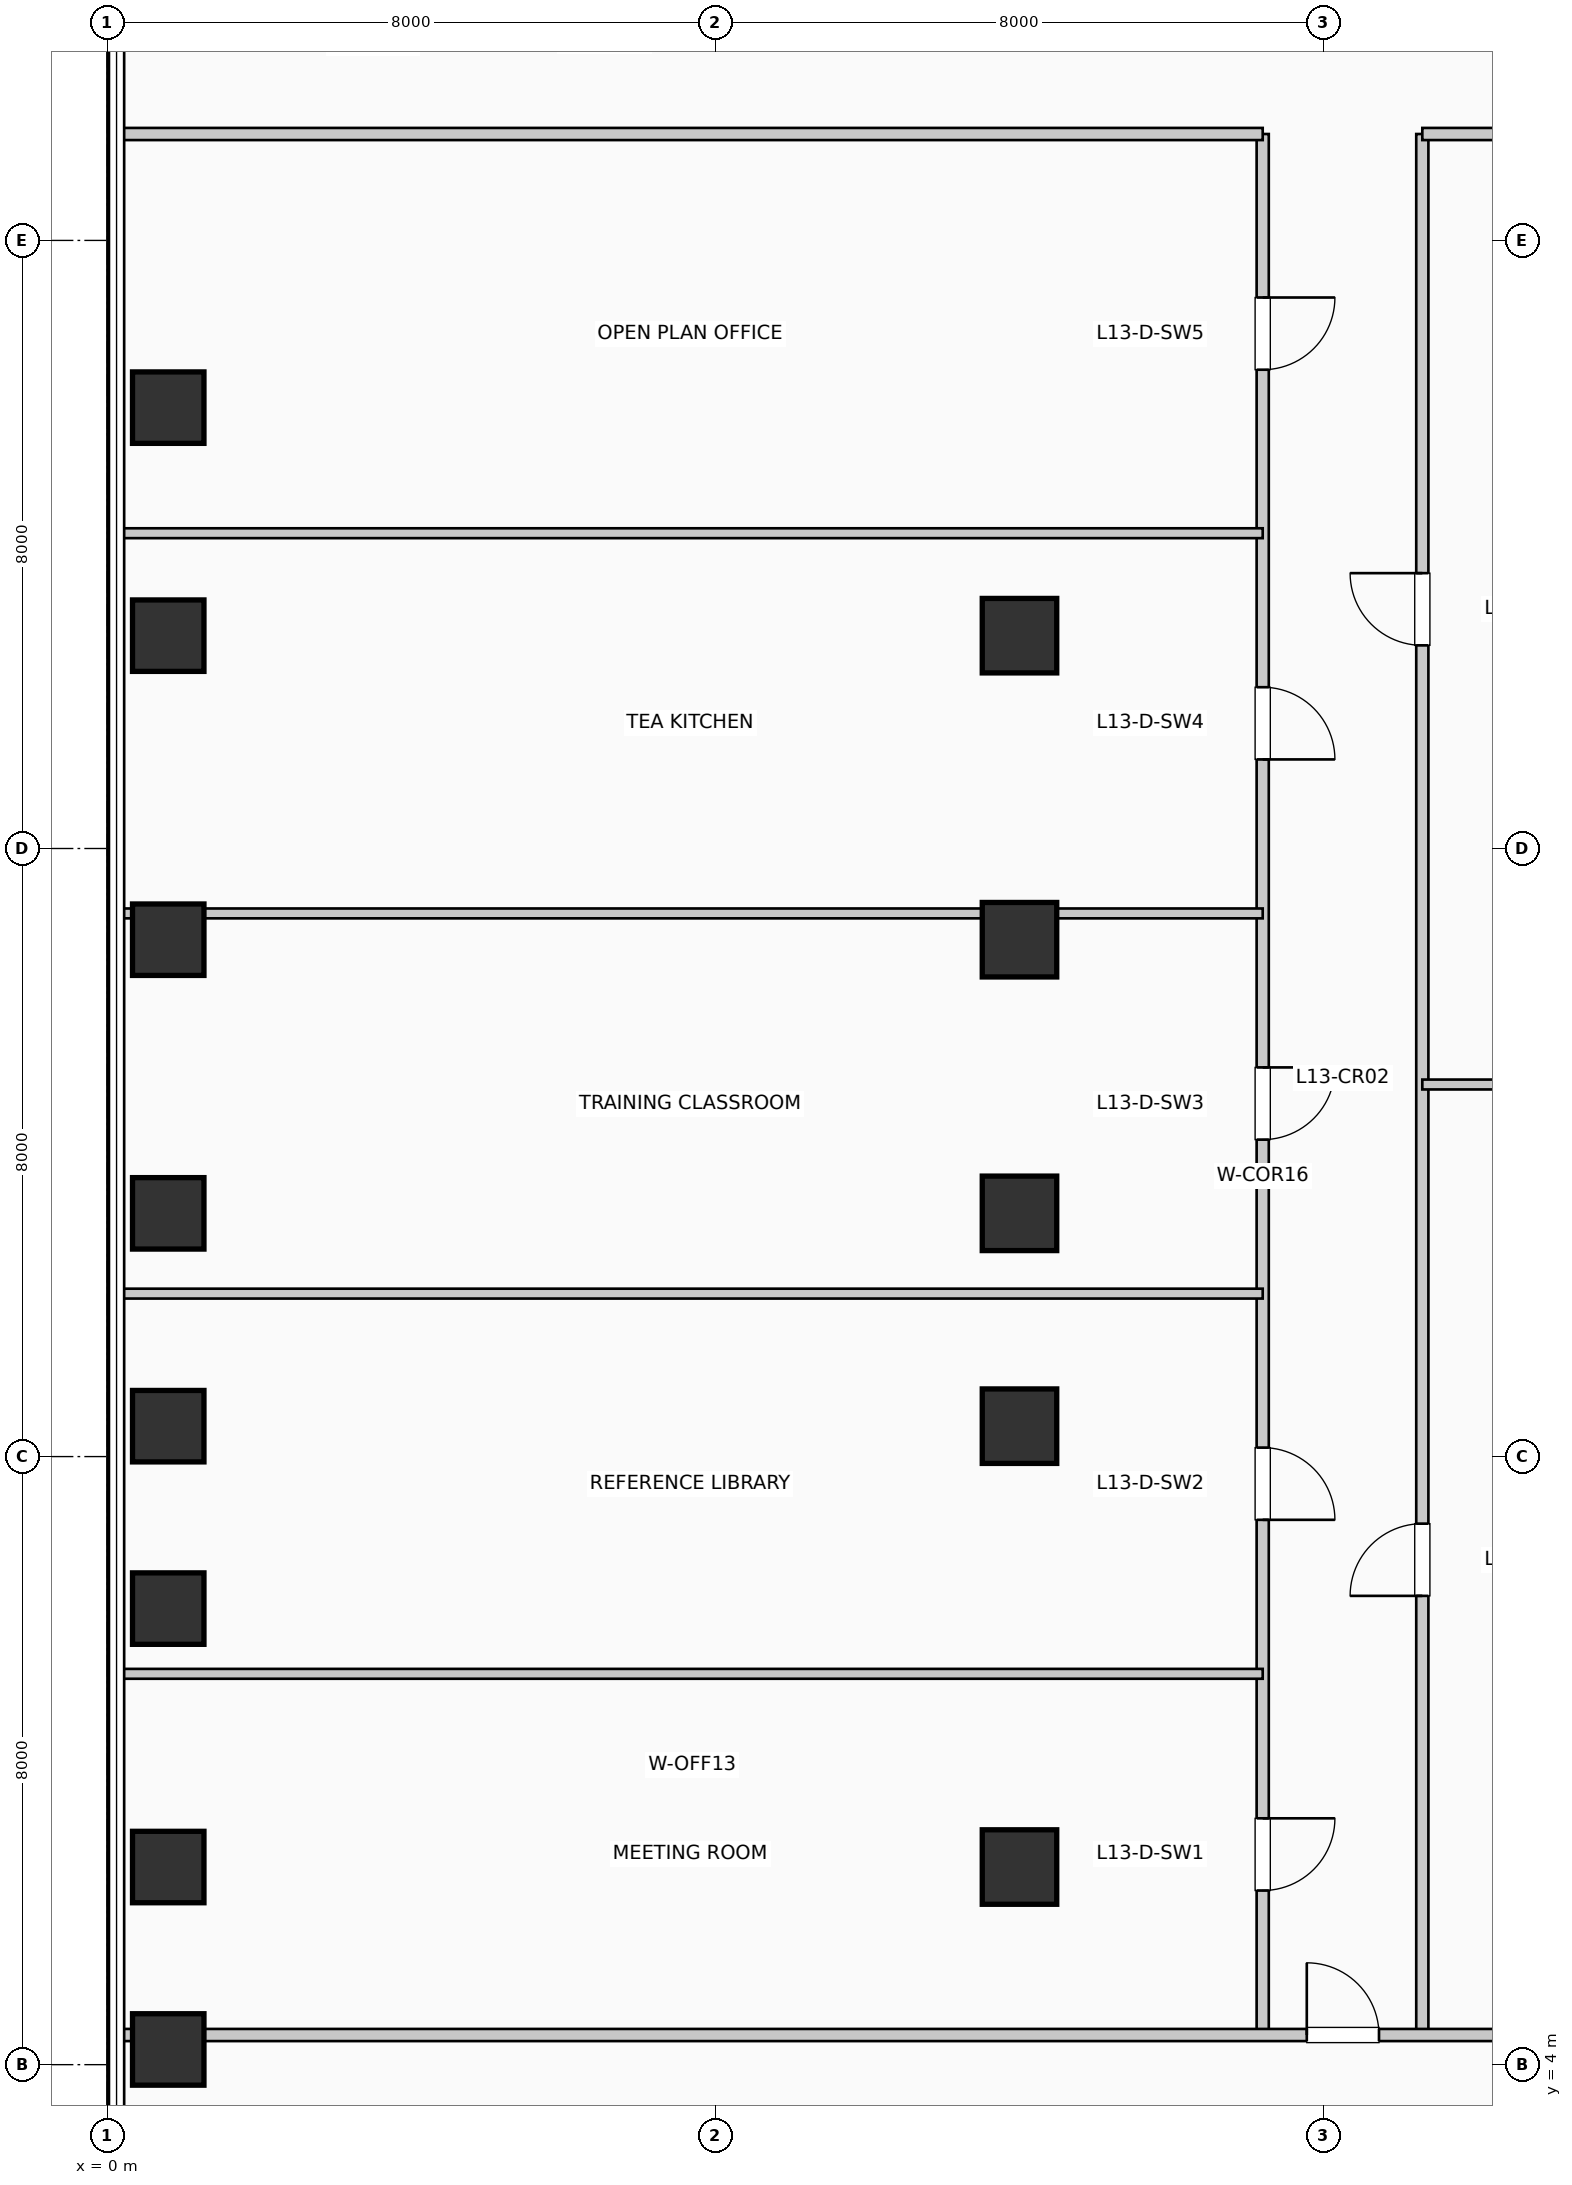
"""IFC4 building model, lengths in metres.
Left out: names, types, materials, properties, quantities, classifications, styles, units other than length and angle.
Written with IfcOpenShell. Run it as: python <this file> out.ifc"""

import sys

from ifc_helpers import new_model, si_unit, direction, frame, frame_2d, origin, origin_2d, place, context, subcontext, project, spatial, rectangle, extrude, element, fill, save


model = new_model("IFC4")
c1 = context("Model", 3, precision=1e-05, world=origin(), true_north=direction((0.0, 1.0)))
c2 = subcontext(c1, "Body", "Model", "MODEL_VIEW")
j1 = project(units=[si_unit("LENGTHUNIT", "METRE"), si_unit("PLANEANGLEUNIT", "RADIAN")], contexts=[c1])
p1 = place(None, origin())
s1 = spatial("IfcSite", under=j1, at=p1, CompositionType="ELEMENT")
p2 = place(p1, origin())
s2 = spatial("IfcBuilding", under=s1, at=p2, CompositionType="ELEMENT")
p3 = place(p2, frame((0.0, 0.0, 58.08)))
s3 = spatial("IfcBuildingStorey", under=s2, at=p3, CompositionType="ELEMENT", Elevation=58.08)
for number, where, z_axis, x_axis in (
    (1, (0.8, 4.2, 0.0), (0.0, 0.0, 1.0), (1.0, 0.0, 0.0)),
    (2, (0.8, 6.6, 0.0), (0.0, 0.0, 1.0), (1.0, 0.0, 0.0)),
    (3, (0.8, 10.0, 0.0), (0.0, 0.0, 1.0), (1.0, 0.0, 0.0)),
    (4, (0.8, 12.4, 0.0), (0.0, 0.0, 1.0), (1.0, 0.0, 0.0)),
    (5, (0.8, 15.2, 0.0), (0.0, 0.0, 1.0), (1.0, 0.0, 0.0)),
    (6, (0.8, 18.8, 0.0), (0.0, 0.0, 1.0), (1.0, 0.0, 0.0)),
    (7, (0.8, 22.8, 0.0), (0.0, 0.0, 1.0), (1.0, 0.0, 0.0)),
    (8, (0.8, 25.8, 0.0), (0.0, 0.0, 1.0), (1.0, 0.0, 0.0)),
):
    element("IfcColumn", number, at=place(p3, frame(where, z_axis=z_axis, x_axis=x_axis)), inside=s3, PredefinedType="COLUMN", context=c2, shape_type="SweptSolid", body=[
        extrude(rectangle(XDim=0.94, YDim=0.94, at=origin_2d()), origin(), (0.0, 0.0, 1.0), 3.96),
    ])
for number, where, z_axis, x_axis in (
    (9, (12.0, 6.6, 0.0), (0.0, 0.0, 1.0), (1.0, 0.0, 0.0)),
    (10, (12.0, 12.4, 0.0), (0.0, 0.0, 1.0), (1.0, 0.0, 0.0)),
    (11, (12.0, 15.2, 0.0), (0.0, 0.0, 1.0), (1.0, 0.0, 0.0)),
    (12, (12.0, 18.8, 0.0), (0.0, 0.0, 1.0), (1.0, 0.0, 0.0)),
    (13, (12.0, 22.8, 0.0), (0.0, 0.0, 1.0), (1.0, 0.0, 0.0)),
):
    element("IfcColumn", number, at=place(p3, frame(where, z_axis=z_axis, x_axis=x_axis)), inside=s3, PredefinedType="COLUMN", context=c2, shape_type="SweptSolid", body=[
        extrude(rectangle(XDim=0.98, YDim=0.98, at=origin_2d()), origin(), (0.0, 0.0, 1.0), 3.96),
    ])
p4 = place(p3, frame((15.2, 4.39, 0.0), z_axis=(0.0, 0.0, 1.0), x_axis=(0.0, 1.0, 0.0)))
e14 = element("IfcWall", 14, at=p4, inside=s3, PredefinedType="PARTITIONING", context=c2, shape_type="SweptSolid", body=[
    extrude(rectangle(XDim=25.01, YDim=0.16, at=frame_2d((12.505, 0.0))), origin(), (0.0, 0.0, 1.0), 3.71),
])
p5 = place(p4, frame((2.851, 0.0, 0.0), z_axis=(0.0, 0.0, 1.0), x_axis=(-1.0, 0.0, 0.0)))
e15 = element("IfcOpeningElement", 15, at=p5, cuts=e14, PredefinedType="OPENING", context=c2, shape_type="SweptSolid", body=[
    extrude(rectangle(XDim=0.95, YDim=2.15, at=frame_2d((0.475, 1.075))), frame((0.0, 0.09, 0.0), z_axis=(0.0, -1.0, 0.0), x_axis=(1.0, 0.0, 0.0)), (0.0, 0.0, 1.0), 0.18),
])
p6 = place(p4, frame((7.728, 0.0, 0.0), z_axis=(0.0, 0.0, 1.0), x_axis=(-1.0, 0.0, 0.0)))
e16 = element("IfcOpeningElement", 16, at=p6, cuts=e14, PredefinedType="OPENING", context=c2, shape_type="SweptSolid", body=[
    extrude(rectangle(XDim=0.95, YDim=2.15, at=frame_2d((0.475, 1.075))), frame((0.0, 0.09, 0.0), z_axis=(0.0, -1.0, 0.0), x_axis=(1.0, 0.0, 0.0)), (0.0, 0.0, 1.0), 0.18),
])
p7 = place(p4, frame((12.73, 0.0, 0.0), z_axis=(0.0, 0.0, 1.0), x_axis=(-1.0, 0.0, 0.0)))
e17 = element("IfcOpeningElement", 17, at=p7, cuts=e14, PredefinedType="OPENING", context=c2, shape_type="SweptSolid", body=[
    extrude(rectangle(XDim=0.95, YDim=2.15, at=frame_2d((0.475, 1.075))), frame((0.0, 0.09, 0.0), z_axis=(0.0, -1.0, 0.0), x_axis=(1.0, 0.0, 0.0)), (0.0, 0.0, 1.0), 0.18),
])
p8 = place(p4, frame((17.732, 0.0, 0.0), z_axis=(0.0, 0.0, 1.0), x_axis=(-1.0, 0.0, 0.0)))
e18 = element("IfcOpeningElement", 18, at=p8, cuts=e14, PredefinedType="OPENING", context=c2, shape_type="SweptSolid", body=[
    extrude(rectangle(XDim=0.95, YDim=2.15, at=frame_2d((0.475, 1.075))), frame((0.0, 0.09, 0.0), z_axis=(0.0, -1.0, 0.0), x_axis=(1.0, 0.0, 0.0)), (0.0, 0.0, 1.0), 0.18),
])
p9 = place(p4, frame((22.859, 0.0, 0.0), z_axis=(0.0, 0.0, 1.0), x_axis=(-1.0, 0.0, 0.0)))
e19 = element("IfcOpeningElement", 19, at=p9, cuts=e14, PredefinedType="OPENING", context=c2, shape_type="SweptSolid", body=[
    extrude(rectangle(XDim=0.95, YDim=2.15, at=frame_2d((0.475, 1.075))), frame((0.0, 0.09, 0.0), z_axis=(0.0, -1.0, 0.0), x_axis=(1.0, 0.0, 0.0)), (0.0, 0.0, 1.0), 0.18),
])
p10 = place(p3, frame((17.3, 4.39, 0.0), z_axis=(0.0, 0.0, 1.0), x_axis=(0.0, 1.0, 0.0)))
e20 = element("IfcWall", 20, at=p10, inside=s3, PredefinedType="PARTITIONING", context=c2, shape_type="SweptSolid", body=[
    extrude(rectangle(XDim=25.01, YDim=0.16, at=frame_2d((12.505, 0.0))), origin(), (0.0, 0.0, 1.0), 3.71),
])
p11 = place(p10, frame((5.778, 0.0, 0.0)))
e21 = element("IfcOpeningElement", 21, at=p11, cuts=e20, PredefinedType="OPENING", context=c2, shape_type="SweptSolid", body=[
    extrude(rectangle(XDim=0.95, YDim=2.15, at=frame_2d((0.475, 1.075))), frame((0.0, 0.09, 0.0), z_axis=(0.0, -1.0, 0.0), x_axis=(1.0, 0.0, 0.0)), (0.0, 0.0, 1.0), 0.18),
])
p12 = place(p10, frame((18.282, 0.0, 0.0)))
e22 = element("IfcOpeningElement", 22, at=p12, cuts=e20, PredefinedType="OPENING", context=c2, shape_type="SweptSolid", body=[
    extrude(rectangle(XDim=0.95, YDim=2.15, at=frame_2d((0.475, 1.075))), frame((0.0, 0.09, 0.0), z_axis=(0.0, -1.0, 0.0), x_axis=(1.0, 0.0, 0.0)), (0.0, 0.0, 1.0), 0.18),
])
p13 = place(p3, frame((0.19, 4.39, 0.0), z_axis=(0.0, 0.0, 1.0), x_axis=(1.0, 0.0, 0.0)))
e23 = element("IfcWall", 23, at=p13, inside=s3, PredefinedType="PARTITIONING", context=c2, shape_type="SweptSolid", body=[
    extrude(rectangle(XDim=23.26, YDim=0.16, at=frame_2d((11.63, 0.0))), origin(), (0.0, 0.0, 1.0), 2.995),
])
p14 = place(p13, frame((15.59, 0.0, 0.0)))
e24 = element("IfcOpeningElement", 24, at=p14, cuts=e23, PredefinedType="OPENING", context=c2, shape_type="SweptSolid", body=[
    extrude(rectangle(XDim=0.95, YDim=2.15, at=frame_2d((0.475, 1.075))), frame((0.0, 0.09, 0.0), z_axis=(0.0, -1.0, 0.0), x_axis=(1.0, 0.0, 0.0)), (0.0, 0.0, 1.0), 0.18),
])
p15 = place(p3, frame((0.19, 29.4, 0.0), z_axis=(0.0, 0.0, 1.0), x_axis=(1.0, 0.0, 0.0)))
e25 = element("IfcWall", 25, at=p15, inside=s3, PredefinedType="PARTITIONING", context=c2, shape_type="SweptSolid", body=[
    extrude(rectangle(XDim=15.01, YDim=0.16, at=frame_2d((7.505, 0.0))), origin(), (0.0, 0.0, 1.0), 3.365),
])
p16 = place(p3, frame((17.3, 29.4, 0.0), z_axis=(0.0, 0.0, 1.0), x_axis=(1.0, 0.0, 0.0)))
e26 = element("IfcWall", 26, at=p16, inside=s3, PredefinedType="PARTITIONING", context=c2, shape_type="SweptSolid", body=[
    extrude(rectangle(XDim=6.15, YDim=0.16, at=frame_2d((3.075, 0.0))), origin(), (0.0, 0.0, 1.0), 3.71),
])
for number, where, z_axis, x_axis in (
    (27, (0.19, 9.142, 0.0), (0.0, 0.0, 1.0), (1.0, 0.0, 0.0)),
    (28, (0.19, 14.144, 0.0), (0.0, 0.0, 1.0), (1.0, 0.0, 0.0)),
):
    element("IfcWall", number, at=place(p3, frame(where, z_axis=z_axis, x_axis=x_axis)), inside=s3, PredefinedType="PARTITIONING", context=c2, shape_type="SweptSolid", body=[
        extrude(rectangle(XDim=15.01, YDim=0.13, at=frame_2d((7.505, 0.0))), origin(), (0.0, 0.0, 1.0), 3.71),
    ])
p17 = place(p3, frame((0.19, 19.146, 0.0), z_axis=(0.0, 0.0, 1.0), x_axis=(1.0, 0.0, 0.0)))
e29 = element("IfcWall", 29, at=p17, inside=s3, PredefinedType="PARTITIONING", context=c2, shape_type="SweptSolid", body=[
    extrude(rectangle(XDim=15.01, YDim=0.13, at=frame_2d((7.505, 0.0))), origin(), (0.0, 0.0, 1.0), 2.995),
])
p18 = place(p3, frame((0.19, 24.148, 0.0), z_axis=(0.0, 0.0, 1.0), x_axis=(1.0, 0.0, 0.0)))
e30 = element("IfcWall", 30, at=p18, inside=s3, PredefinedType="PARTITIONING", context=c2, shape_type="SweptSolid", body=[
    extrude(rectangle(XDim=15.01, YDim=0.13, at=frame_2d((7.505, 0.0))), origin(), (0.0, 0.0, 1.0), 3.71),
])
p19 = place(p3, frame((17.3, 16.895, 0.0), z_axis=(0.0, 0.0, 1.0), x_axis=(1.0, 0.0, 0.0)))
e31 = element("IfcWall", 31, at=p19, inside=s3, PredefinedType="PARTITIONING", context=c2, shape_type="SweptSolid", body=[
    extrude(rectangle(XDim=6.15, YDim=0.13, at=frame_2d((3.075, 0.0))), origin(), (0.0, 0.0, 1.0), 3.71),
])
p20 = place(p14, origin())
e32 = element("IfcDoor", 32, at=p20, inside=s3, OperationType="SINGLE_SWING_LEFT", PredefinedType="DOOR", context=c2, shape_type="SweptSolid", body=[
    extrude(rectangle(XDim=0.95, YDim=2.15, at=frame_2d((0.475, 1.075))), frame((0.0, 0.025, 0.0), z_axis=(0.0, -1.0, 0.0), x_axis=(1.0, 0.0, 0.0)), (0.0, 0.0, 1.0), 0.05),
])
fill(e24, e32)
p21 = place(p5, origin())
e33 = element("IfcDoor", 33, at=p21, inside=s3, OperationType="SINGLE_SWING_RIGHT", PredefinedType="DOOR", context=c2, shape_type="SweptSolid", body=[
    extrude(rectangle(XDim=0.95, YDim=2.15, at=frame_2d((0.475, 1.075))), frame((0.0, 0.025, 0.0), z_axis=(0.0, -1.0, 0.0), x_axis=(1.0, 0.0, 0.0)), (0.0, 0.0, 1.0), 0.05),
])
fill(e15, e33)
p22 = place(p6, origin())
e34 = element("IfcDoor", 34, at=p22, inside=s3, OperationType="SINGLE_SWING_LEFT", PredefinedType="DOOR", context=c2, shape_type="SweptSolid", body=[
    extrude(rectangle(XDim=0.95, YDim=2.15, at=frame_2d((0.475, 1.075))), frame((0.0, 0.025, 0.0), z_axis=(0.0, -1.0, 0.0), x_axis=(1.0, 0.0, 0.0)), (0.0, 0.0, 1.0), 0.05),
])
fill(e16, e34)
p23 = place(p7, origin())
e35 = element("IfcDoor", 35, at=p23, inside=s3, OperationType="SINGLE_SWING_RIGHT", PredefinedType="DOOR", context=c2, shape_type="SweptSolid", body=[
    extrude(rectangle(XDim=0.95, YDim=2.15, at=frame_2d((0.475, 1.075))), frame((0.0, 0.025, 0.0), z_axis=(0.0, -1.0, 0.0), x_axis=(1.0, 0.0, 0.0)), (0.0, 0.0, 1.0), 0.05),
])
fill(e17, e35)
p24 = place(p8, origin())
e36 = element("IfcDoor", 36, at=p24, inside=s3, OperationType="SINGLE_SWING_LEFT", PredefinedType="DOOR", context=c2, shape_type="SweptSolid", body=[
    extrude(rectangle(XDim=0.95, YDim=2.15, at=frame_2d((0.475, 1.075))), frame((0.0, 0.025, 0.0), z_axis=(0.0, -1.0, 0.0), x_axis=(1.0, 0.0, 0.0)), (0.0, 0.0, 1.0), 0.05),
])
fill(e18, e36)
p25 = place(p9, origin())
e37 = element("IfcDoor", 37, at=p25, inside=s3, OperationType="SINGLE_SWING_RIGHT", PredefinedType="DOOR", context=c2, shape_type="SweptSolid", body=[
    extrude(rectangle(XDim=0.95, YDim=2.15, at=frame_2d((0.475, 1.075))), frame((0.0, 0.025, 0.0), z_axis=(0.0, -1.0, 0.0), x_axis=(1.0, 0.0, 0.0)), (0.0, 0.0, 1.0), 0.05),
])
fill(e19, e37)
p26 = place(p11, origin())
e38 = element("IfcDoor", 38, at=p26, inside=s3, OperationType="SINGLE_SWING_LEFT", PredefinedType="DOOR", context=c2, shape_type="SweptSolid", body=[
    extrude(rectangle(XDim=0.95, YDim=2.15, at=frame_2d((0.475, 1.075))), frame((0.0, 0.025, 0.0), z_axis=(0.0, -1.0, 0.0), x_axis=(1.0, 0.0, 0.0)), (0.0, 0.0, 1.0), 0.05),
])
fill(e21, e38)
p27 = place(p12, origin())
e39 = element("IfcDoor", 39, at=p27, inside=s3, OperationType="SINGLE_SWING_RIGHT", PredefinedType="DOOR", context=c2, shape_type="SweptSolid", body=[
    extrude(rectangle(XDim=0.95, YDim=2.15, at=frame_2d((0.475, 1.075))), frame((0.0, 0.025, 0.0), z_axis=(0.0, -1.0, 0.0), x_axis=(1.0, 0.0, 0.0)), (0.0, 0.0, 1.0), 0.05),
])
fill(e22, e39)
save(model, sys.argv[1])
